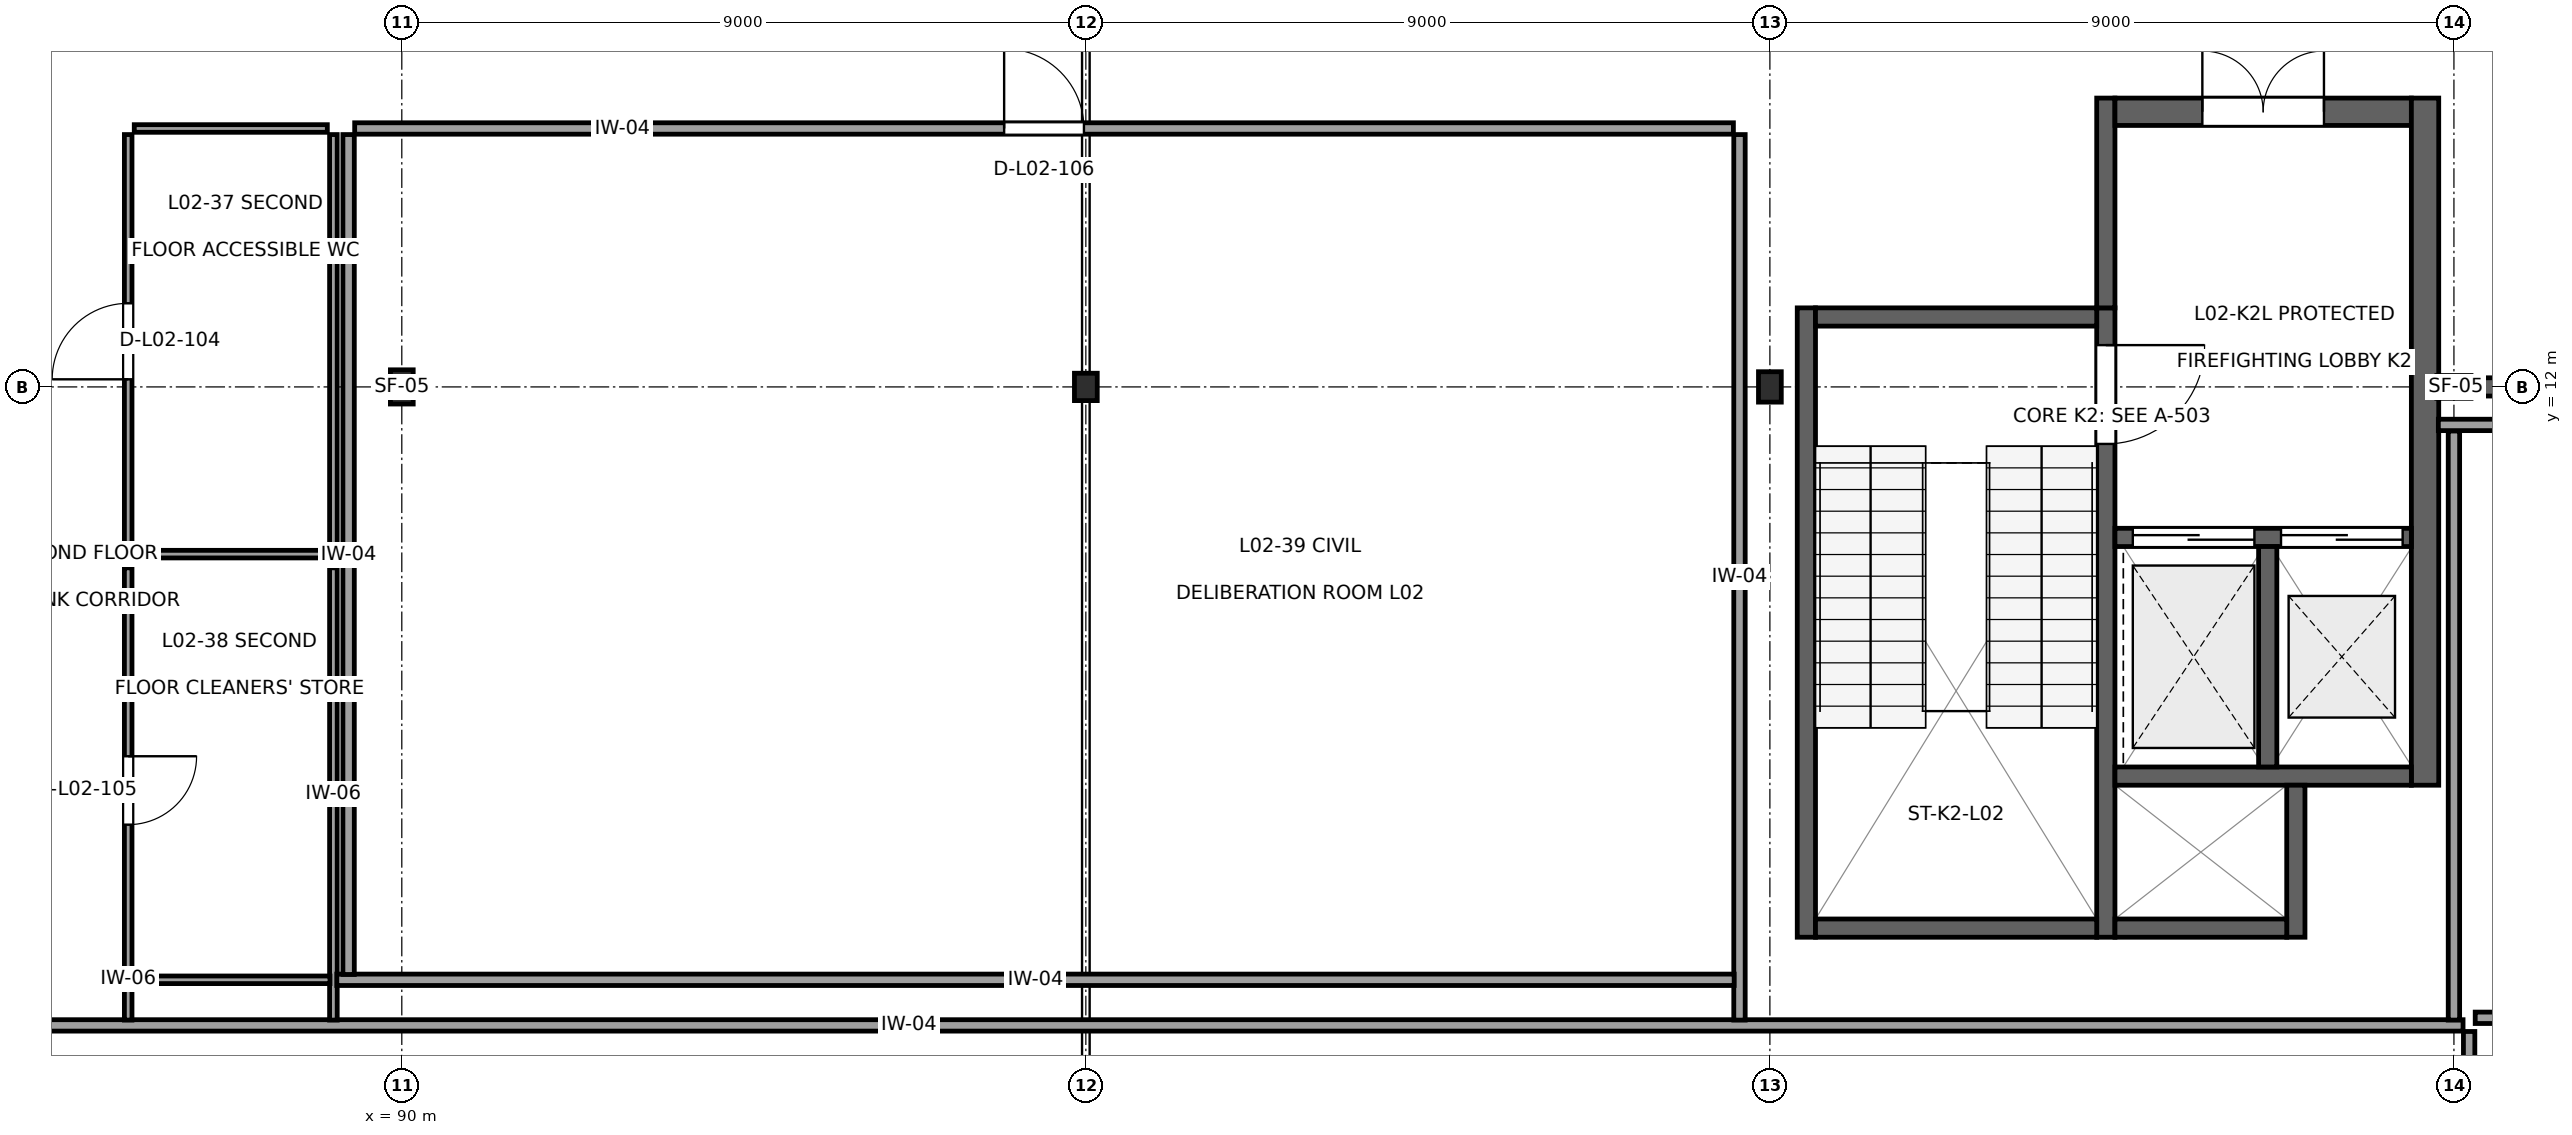
"""IFC4 building model, lengths in metres.
Left out: names, types, materials, properties, quantities, classifications, styles, units other than length and angle.
Written with IfcOpenShell. Run it as: python <this file> out.ifc"""

import sys

from ifc_helpers import new_model, si_unit, direction, frame, frame_2d, origin, origin_2d, place, context, subcontext, project, spatial, rectangle, i_section, extrude, element, fill, save


model = new_model("IFC4")
c1 = context("Model", 3, precision=1e-05, world=origin(), true_north=direction((0.0, 1.0)))
c2 = subcontext(c1, "Body", "Model", "MODEL_VIEW")
j1 = project(units=[si_unit("LENGTHUNIT", "METRE"), si_unit("PLANEANGLEUNIT", "RADIAN")], contexts=[c1])
p1 = place(None, origin())
s1 = spatial("IfcSite", under=j1, at=p1, CompositionType="ELEMENT")
p2 = place(p1, origin())
s2 = spatial("IfcBuilding", under=s1, at=p2, CompositionType="ELEMENT")
p3 = place(p2, frame((0.0, 0.0, 9.9)))
s3 = spatial("IfcBuildingStorey", under=s2, at=p3, CompositionType="ELEMENT", Elevation=9.9)
p4 = place(p3, frame((90.0, 12.0, 0.0), z_axis=(0.0, 0.0, 1.0), x_axis=(1.0, 0.0, 0.0)))
e1 = element("IfcColumn", 1, at=p4, inside=s3, PredefinedType="COLUMN", context=c2, shape_type="SweptSolid", body=[
    extrude(i_section(OverallWidth=0.3, OverallDepth=0.45, WebThickness=0.014, FlangeThickness=0.026, at=origin_2d()), origin(), (0.0, 0.0, 1.0), 4.5),
])
p5 = place(p3, frame((99.0, 12.0, 0.0), z_axis=(0.0, 0.0, 1.0), x_axis=(1.0, 0.0, 0.0)))
e2 = element("IfcColumn", 2, at=p5, inside=s3, PredefinedType="COLUMN", context=c2, shape_type="SweptSolid", body=[
    extrude(i_section(OverallWidth=0.3, OverallDepth=0.36, WebThickness=0.012, FlangeThickness=0.022, at=origin_2d()), origin(), (0.0, 0.0, 1.0), 4.5),
])
p6 = place(p3, frame((108.0, 12.0, 0.0), z_axis=(0.0, 0.0, 1.0), x_axis=(1.0, 0.0, 0.0)))
e3 = element("IfcColumn", 3, at=p6, inside=s3, PredefinedType="COLUMN", context=c2, shape_type="SweptSolid", body=[
    extrude(i_section(OverallWidth=0.3, OverallDepth=0.4, WebThickness=0.013, FlangeThickness=0.024, at=origin_2d()), origin(), (0.0, 0.0, 1.0), 4.5),
])
p7 = place(p3, frame((117.0, 12.0, 0.0), z_axis=(0.0, 0.0, 1.0), x_axis=(0.0, 1.0, 0.0)))
e4 = element("IfcColumn", 4, at=p7, inside=s3, PredefinedType="COLUMN", context=c2, shape_type="SweptSolid", body=[
    extrude(i_section(OverallWidth=0.3, OverallDepth=0.45, WebThickness=0.014, FlangeThickness=0.026, at=origin_2d()), origin(), (0.0, 0.0, 1.0), 4.5),
])
p8 = place(p3, frame((108.48, 4.76, 0.0), z_axis=(0.0, 0.0, 1.0), x_axis=(0.0, 1.0, 0.0)))
e5 = element("IfcWall", 5, at=p8, inside=s3, PredefinedType="SHEAR", context=c2, shape_type="SweptSolid", body=[
    extrude(rectangle(XDim=8.28, YDim=0.24, at=frame_2d((4.14, 0.0))), origin(), (0.0, 0.0, 1.0), 4.31),
])
p9 = place(p3, frame((112.42, 4.76, 0.0), z_axis=(0.0, 0.0, 1.0), x_axis=(0.0, 1.0, 0.0)))
e6 = element("IfcWall", 6, at=p9, inside=s3, PredefinedType="SHEAR", context=c2, shape_type="SweptSolid", body=[
    extrude(rectangle(XDim=8.28, YDim=0.24, at=frame_2d((4.14, 0.0))), origin(), (0.0, 0.0, 1.0), 4.31),
])
p10 = place(p9, frame((6.49, 0.0, 0.0)))
e7 = element("IfcOpeningElement", 7, at=p10, cuts=e6, PredefinedType="OPENING", context=c2, shape_type="SweptSolid", body=[
    extrude(rectangle(XDim=1.3, YDim=2.2, at=frame_2d((0.65, 1.1))), frame((0.0, 0.135, 0.0), z_axis=(0.0, -1.0, 0.0), x_axis=(1.0, 0.0, 0.0)), (0.0, 0.0, 1.0), 0.27),
])
for number, where, z_axis, x_axis in (
    (8, (108.6, 4.88, 0.0), (0.0, 0.0, 1.0), (1.0, 0.0, 0.0)),
    (9, (108.6, 12.92, 0.0), (0.0, 0.0, 1.0), (1.0, 0.0, 0.0)),
):
    element("IfcWall", number, at=place(p3, frame(where, z_axis=z_axis, x_axis=x_axis)), inside=s3, PredefinedType="SHEAR", context=c2, shape_type="SweptSolid", body=[
        extrude(rectangle(XDim=3.7, YDim=0.24, at=frame_2d((1.85, 0.0))), origin(), (0.0, 0.0, 1.0), 4.31),
    ])
p11 = place(p3, frame((112.42, 13.04, 0.0), z_axis=(0.0, 0.0, 1.0), x_axis=(0.0, 1.0, 0.0)))
e10 = element("IfcWall", 10, at=p11, inside=s3, PredefinedType="SHEAR", context=c2, shape_type="SweptSolid", body=[
    extrude(rectangle(XDim=2.76, YDim=0.24, at=frame_2d((1.38, 0.0))), origin(), (0.0, 0.0, 1.0), 4.16),
])
p12 = place(p3, frame((112.54, 15.62, 0.0), z_axis=(0.0, 0.0, 1.0), x_axis=(1.0, 0.0, 0.0)))
e11 = element("IfcWall", 11, at=p12, inside=s3, PredefinedType="SHEAR", context=c2, shape_type="SweptSolid", body=[
    extrude(rectangle(XDim=3.9, YDim=0.36, at=frame_2d((1.95, 0.0))), origin(), (0.0, 0.0, 1.0), 4.16),
])
p13 = place(p12, frame((1.15, 0.0, 0.0)))
e12 = element("IfcOpeningElement", 12, at=p13, cuts=e11, PredefinedType="OPENING", context=c2, shape_type="SweptSolid", body=[
    extrude(rectangle(XDim=1.6, YDim=2.25, at=frame_2d((0.8, 1.125))), frame((0.0, 0.195, 0.0), z_axis=(0.0, -1.0, 0.0), x_axis=(1.0, 0.0, 0.0)), (0.0, 0.0, 1.0), 0.39),
])
p14 = place(p3, frame((116.62, 6.76, 0.0), z_axis=(0.0, 0.0, 1.0), x_axis=(0.0, 1.0, 0.0)))
e13 = element("IfcWall", 13, at=p14, inside=s3, PredefinedType="SHEAR", context=c2, shape_type="SweptSolid", body=[
    extrude(rectangle(XDim=9.04, YDim=0.36, at=frame_2d((4.52, 0.0))), origin(), (0.0, 0.0, 1.0), 4.16),
])
p15 = place(p3, frame((112.54, 10.02, 0.0), z_axis=(0.0, 0.0, 1.0), x_axis=(1.0, 0.0, 0.0)))
e14 = element("IfcWall", 14, at=p15, inside=s3, PredefinedType="SHEAR", context=c2, shape_type="SweptSolid", body=[
    extrude(rectangle(XDim=3.9, YDim=0.24, at=frame_2d((1.95, 0.0))), origin(), (0.0, 0.0, 1.0), 4.31),
])
p16 = place(p15, frame((0.235, 0.0, 0.0)))
e15 = element("IfcOpeningElement", 15, at=p16, cuts=e14, PredefinedType="OPENING", context=c2, shape_type="SweptSolid", body=[
    extrude(rectangle(XDim=1.6, YDim=2.3, at=frame_2d((0.8, 1.15))), frame((0.0, 0.135, 0.0), z_axis=(0.0, -1.0, 0.0), x_axis=(1.0, 0.0, 0.0)), (0.0, 0.0, 1.0), 0.27),
])
p17 = place(p15, frame((2.185, 0.0, 0.0)))
e16 = element("IfcOpeningElement", 16, at=p17, cuts=e14, PredefinedType="OPENING", context=c2, shape_type="SweptSolid", body=[
    extrude(rectangle(XDim=1.6, YDim=2.3, at=frame_2d((0.8, 1.15))), frame((0.0, 0.135, 0.0), z_axis=(0.0, -1.0, 0.0), x_axis=(1.0, 0.0, 0.0)), (0.0, 0.0, 1.0), 0.27),
])
p18 = place(p3, frame((112.54, 6.88, 0.0), z_axis=(0.0, 0.0, 1.0), x_axis=(1.0, 0.0, 0.0)))
e17 = element("IfcWall", 17, at=p18, inside=s3, PredefinedType="SHEAR", context=c2, shape_type="SweptSolid", body=[
    extrude(rectangle(XDim=3.9, YDim=0.24, at=frame_2d((1.95, 0.0))), origin(), (0.0, 0.0, 1.0), 4.31),
])
p19 = place(p3, frame((114.55, 7.0, 0.0), z_axis=(0.0, 0.0, 1.0), x_axis=(0.0, 1.0, 0.0)))
e18 = element("IfcWall", 18, at=p19, inside=s3, PredefinedType="SHEAR", context=c2, shape_type="SweptSolid", body=[
    extrude(rectangle(XDim=2.9, YDim=0.24, at=frame_2d((1.45, 0.0))), origin(), (0.0, 0.0, 1.0), 4.31),
])
p20 = place(p3, frame((114.92, 4.76, 0.0), z_axis=(0.0, 0.0, 1.0), x_axis=(0.0, 1.0, 0.0)))
e19 = element("IfcWall", 19, at=p20, inside=s3, PredefinedType="SHEAR", context=c2, shape_type="SweptSolid", body=[
    extrude(rectangle(XDim=2.0, YDim=0.24, at=frame_2d((1.0, 0.0))), origin(), (0.0, 0.0, 1.0), 4.31),
])
p21 = place(p3, frame((112.54, 4.88, 0.0), z_axis=(0.0, 0.0, 1.0), x_axis=(1.0, 0.0, 0.0)))
e20 = element("IfcWall", 20, at=p21, inside=s3, PredefinedType="SHEAR", context=c2, shape_type="SweptSolid", body=[
    extrude(rectangle(XDim=2.26, YDim=0.24, at=frame_2d((1.13, 0.0))), origin(), (0.0, 0.0, 1.0), 4.31),
])
p22 = place(p3, frame((117.223, 12.0, 0.0), z_axis=(0.0, 0.0, 1.0), x_axis=(1.0, 0.0, 0.0)))
e21 = element("IfcWall", 21, at=p22, inside=s3, PredefinedType="SHEAR", context=c2, shape_type="SweptSolid", body=[
    extrude(rectangle(XDim=8.769, YDim=0.24, at=frame_2d((4.385, 0.0))), origin(), (0.0, 0.0, 1.0), 3.675),
])
p23 = place(p3, frame((46.08, 3.6, 0.0), z_axis=(0.0, 0.0, 1.0), x_axis=(1.0, 0.0, 0.0)))
e22 = element("IfcWall", 22, at=p23, inside=s3, PredefinedType="PARTITIONING", context=c2, shape_type="SweptSolid", body=[
    extrude(rectangle(XDim=71.04, YDim=0.15, at=frame_2d((35.52, 0.0))), origin(), (0.0, 0.0, 1.0), 4.14),
])
p24 = place(p23, frame((27.595, 0.0, 0.0)))
e23 = element("IfcOpeningElement", 23, at=p24, cuts=e22, PredefinedType="OPENING", context=c2, shape_type="SweptSolid", body=[
    extrude(rectangle(XDim=1.05, YDim=2.25, at=frame_2d((0.525, 1.125))), frame((0.0, 0.09, 0.0), z_axis=(0.0, -1.0, 0.0), x_axis=(1.0, 0.0, 0.0)), (0.0, 0.0, 1.0), 0.18),
])
p25 = place(p3, frame((117.2, 3.52, 0.0), z_axis=(0.0, 0.0, 1.0), x_axis=(0.0, -1.0, 0.0)))
e24 = element("IfcWall", 24, at=p25, inside=s3, PredefinedType="PARTITIONING", context=c2, shape_type="SweptSolid", body=[
    extrude(rectangle(XDim=3.322, YDim=0.15, at=frame_2d((1.661, 0.0))), origin(), (0.0, 0.0, 1.0), 3.625),
])
p26 = place(p3, frame((134.855, 3.7, 0.0), z_axis=(0.0, 0.0, 1.0), x_axis=(-1.0, 0.0, 0.0)))
e25 = element("IfcWall", 25, at=p26, inside=s3, PredefinedType="PARTITIONING", context=c2, shape_type="SweptSolid", body=[
    extrude(rectangle(XDim=17.575, YDim=0.15, at=frame_2d((8.788, 0.0))), origin(), (0.0, 0.0, 1.0), 4.14),
])
p27 = place(p3, frame((117.0, 3.67, 0.0), z_axis=(0.0, 0.0, 1.0), x_axis=(0.0, 1.0, 0.0)))
e26 = element("IfcWall", 26, at=p27, inside=s3, PredefinedType="PARTITIONING", context=c2, shape_type="SweptSolid", body=[
    extrude(rectangle(XDim=7.75, YDim=0.15, at=frame_2d((3.875, 0.0))), origin(), (0.0, 0.0, 1.0), 3.625),
])
p28 = place(p3, frame((116.795, 11.5, 0.0), z_axis=(0.0, 0.0, 1.0), x_axis=(1.0, 0.0, 0.0)))
e27 = element("IfcWall", 27, at=p28, inside=s3, PredefinedType="PARTITIONING", context=c2, shape_type="SweptSolid", body=[
    extrude(rectangle(XDim=9.425, YDim=0.15, at=frame_2d((4.712, 0.0))), origin(), (0.0, 0.0, 1.0), 4.14),
])
p29 = place(p3, frame((86.4, 9.88, 0.0), z_axis=(0.0, 0.0, 1.0), x_axis=(0.0, 1.0, 0.0)))
e28 = element("IfcWall", 28, at=p29, inside=s3, PredefinedType="PARTITIONING", context=c2, shape_type="SweptSolid", body=[
    extrude(rectangle(XDim=5.44, YDim=0.1, at=frame_2d((2.72, 0.0))), origin(), (0.0, 0.0, 1.0), 4.14),
])
p30 = place(p29, frame((2.22, 0.0, 0.0)))
e29 = element("IfcOpeningElement", 29, at=p30, cuts=e28, PredefinedType="OPENING", context=c2, shape_type="SweptSolid", body=[
    extrude(rectangle(XDim=1.0, YDim=2.1, at=frame_2d((0.5, 1.05))), frame((0.0, 0.065, 0.0), z_axis=(0.0, -1.0, 0.0), x_axis=(1.0, 0.0, 0.0)), (0.0, 0.0, 1.0), 0.13),
])
p31 = place(p3, frame((86.48, 15.4, 0.0), z_axis=(0.0, 0.0, 1.0), x_axis=(1.0, 0.0, 0.0)))
e30 = element("IfcWall", 30, at=p31, inside=s3, PredefinedType="PARTITIONING", context=c2, shape_type="SweptSolid", body=[
    extrude(rectangle(XDim=2.54, YDim=0.1, at=frame_2d((1.27, 0.0))), origin(), (0.0, 0.0, 1.0), 4.14),
])
p32 = place(p3, frame((89.1, 15.32, 0.0), z_axis=(0.0, 0.0, 1.0), x_axis=(0.0, -1.0, 0.0)))
e31 = element("IfcWall", 31, at=p32, inside=s3, PredefinedType="PARTITIONING", context=c2, shape_type="SweptSolid", body=[
    extrude(rectangle(XDim=5.44, YDim=0.1, at=frame_2d((2.72, 0.0))), origin(), (0.0, 0.0, 1.0), 4.14),
])
p33 = place(p3, frame((89.02, 9.8, 0.0), z_axis=(0.0, 0.0, 1.0), x_axis=(-1.0, 0.0, 0.0)))
e32 = element("IfcWall", 32, at=p33, inside=s3, PredefinedType="PARTITIONING", context=c2, shape_type="SweptSolid", body=[
    extrude(rectangle(XDim=2.54, YDim=0.1, at=frame_2d((1.27, 0.0))), origin(), (0.0, 0.0, 1.0), 4.14),
])
p34 = place(p3, frame((89.1, 9.62, 0.0), z_axis=(0.0, 0.0, 1.0), x_axis=(0.0, -1.0, 0.0)))
e33 = element("IfcWall", 33, at=p34, inside=s3, PredefinedType="PARTITIONING", context=c2, shape_type="SweptSolid", body=[
    extrude(rectangle(XDim=5.95, YDim=0.1, at=frame_2d((2.975, 0.0))), origin(), (0.0, 0.0, 1.0), 4.14),
])
p35 = place(p3, frame((89.055, 4.2, 0.0), z_axis=(0.0, 0.0, 1.0), x_axis=(-1.0, 0.0, 0.0)))
e34 = element("IfcWall", 34, at=p35, inside=s3, PredefinedType="PARTITIONING", context=c2, shape_type="SweptSolid", body=[
    extrude(rectangle(XDim=2.575, YDim=0.1, at=frame_2d((1.288, 0.0))), origin(), (0.0, 0.0, 1.0), 4.14),
])
p36 = place(p3, frame((86.4, 3.67, 0.0), z_axis=(0.0, 0.0, 1.0), x_axis=(0.0, 1.0, 0.0)))
e35 = element("IfcWall", 35, at=p36, inside=s3, PredefinedType="PARTITIONING", context=c2, shape_type="SweptSolid", body=[
    extrude(rectangle(XDim=5.95, YDim=0.1, at=frame_2d((2.975, 0.0))), origin(), (0.0, 0.0, 1.0), 4.14),
])
p37 = place(p36, frame((2.571, 0.0, 0.0)))
e36 = element("IfcOpeningElement", 36, at=p37, cuts=e35, PredefinedType="OPENING", context=c2, shape_type="SweptSolid", body=[
    extrude(rectangle(XDim=0.9, YDim=2.05, at=frame_2d((0.45, 1.025))), frame((0.0, 0.065, 0.0), z_axis=(0.0, -1.0, 0.0), x_axis=(1.0, 0.0, 0.0)), (0.0, 0.0, 1.0), 0.13),
])
p38 = place(p3, frame((107.6, 15.32, 0.0), z_axis=(0.0, 0.0, 1.0), x_axis=(0.0, -1.0, 0.0)))
e37 = element("IfcWall", 37, at=p38, inside=s3, PredefinedType="PARTITIONING", context=c2, shape_type="SweptSolid", body=[
    extrude(rectangle(XDim=11.65, YDim=0.15, at=frame_2d((5.825, 0.0))), origin(), (0.0, 0.0, 1.0), 4.14),
])
p39 = place(p3, frame((107.53, 4.2, 0.0), z_axis=(0.0, 0.0, 1.0), x_axis=(-1.0, 0.0, 0.0)))
e38 = element("IfcWall", 38, at=p39, inside=s3, PredefinedType="PARTITIONING", context=c2, shape_type="SweptSolid", body=[
    extrude(rectangle(XDim=18.385, YDim=0.15, at=frame_2d((9.192, 0.0))), origin(), (0.0, 0.0, 1.0), 4.14),
])
p40 = place(p3, frame((89.3, 4.27, 0.0), z_axis=(0.0, 0.0, 1.0), x_axis=(0.0, 1.0, 0.0)))
e39 = element("IfcWall", 39, at=p40, inside=s3, PredefinedType="PARTITIONING", context=c2, shape_type="SweptSolid", body=[
    extrude(rectangle(XDim=11.05, YDim=0.15, at=frame_2d((5.525, 0.0))), origin(), (0.0, 0.0, 1.0), 4.14),
])
p41 = place(p3, frame((89.38, 15.4, 0.0), z_axis=(0.0, 0.0, 1.0), x_axis=(1.0, 0.0, 0.0)))
e40 = element("IfcWall", 40, at=p41, inside=s3, PredefinedType="PARTITIONING", context=c2, shape_type="SweptSolid", body=[
    extrude(rectangle(XDim=18.14, YDim=0.15, at=frame_2d((9.07, 0.0))), origin(), (0.0, 0.0, 1.0), 4.14),
])
p42 = place(p41, frame((8.545, 0.0, 0.0)))
e41 = element("IfcOpeningElement", 41, at=p42, cuts=e40, PredefinedType="OPENING", context=c2, shape_type="SweptSolid", body=[
    extrude(rectangle(XDim=1.05, YDim=2.25, at=frame_2d((0.525, 1.125))), frame((0.0, 0.09, 0.0), z_axis=(0.0, -1.0, 0.0), x_axis=(1.0, 0.0, 0.0)), (0.0, 0.0, 1.0), 0.18),
])
p43 = place(p10, frame((1.3, 0.0, 0.0), z_axis=(0.0, 0.0, 1.0), x_axis=(-1.0, 0.0, 0.0)))
e42 = element("IfcDoor", 42, at=p43, inside=s3, OperationType="SINGLE_SWING_RIGHT", PredefinedType="DOOR", context=c2, shape_type="SweptSolid", body=[
    extrude(rectangle(XDim=1.3, YDim=2.2, at=frame_2d((0.65, 1.1))), frame((0.0, 0.025, 0.0), z_axis=(0.0, -1.0, 0.0), x_axis=(1.0, 0.0, 0.0)), (0.0, 0.0, 1.0), 0.05),
])
fill(e7, e42)
p44 = place(p13, origin())
e43 = element("IfcDoor", 43, at=p44, inside=s3, OperationType="DOUBLE_DOOR_SINGLE_SWING", PredefinedType="DOOR", context=c2, shape_type="SweptSolid", body=[
    extrude(rectangle(XDim=1.6, YDim=2.25, at=frame_2d((0.8, 1.125))), frame((0.0, 0.025, 0.0), z_axis=(0.0, -1.0, 0.0), x_axis=(1.0, 0.0, 0.0)), (0.0, 0.0, 1.0), 0.05),
])
fill(e12, e43)
p45 = place(p16, origin())
e44 = element("IfcDoor", 44, at=p45, inside=s3, OperationType="DOUBLE_DOOR_SLIDING", PredefinedType="DOOR", context=c2, shape_type="SweptSolid", body=[
    extrude(rectangle(XDim=1.6, YDim=2.3, at=frame_2d((0.8, 1.15))), frame((0.0, 0.025, 0.0), z_axis=(0.0, -1.0, 0.0), x_axis=(1.0, 0.0, 0.0)), (0.0, 0.0, 1.0), 0.05),
])
fill(e15, e44)
p46 = place(p17, origin())
e45 = element("IfcDoor", 45, at=p46, inside=s3, OperationType="DOUBLE_DOOR_SLIDING", PredefinedType="DOOR", context=c2, shape_type="SweptSolid", body=[
    extrude(rectangle(XDim=1.6, YDim=2.3, at=frame_2d((0.8, 1.15))), frame((0.0, 0.025, 0.0), z_axis=(0.0, -1.0, 0.0), x_axis=(1.0, 0.0, 0.0)), (0.0, 0.0, 1.0), 0.05),
])
fill(e16, e45)
p47 = place(p30, origin())
e46 = element("IfcDoor", 46, at=p47, inside=s3, OperationType="SINGLE_SWING_LEFT", PredefinedType="DOOR", context=c2, shape_type="SweptSolid", body=[
    extrude(rectangle(XDim=1.0, YDim=2.1, at=frame_2d((0.5, 1.05))), frame((0.0, 0.025, 0.0), z_axis=(0.0, -1.0, 0.0), x_axis=(1.0, 0.0, 0.0)), (0.0, 0.0, 1.0), 0.05),
])
fill(e29, e46)
p48 = place(p37, frame((0.9, 0.0, 0.0), z_axis=(0.0, 0.0, 1.0), x_axis=(-1.0, 0.0, 0.0)))
e47 = element("IfcDoor", 47, at=p48, inside=s3, OperationType="SINGLE_SWING_RIGHT", PredefinedType="DOOR", context=c2, shape_type="SweptSolid", body=[
    extrude(rectangle(XDim=0.9, YDim=2.05, at=frame_2d((0.45, 1.025))), frame((0.0, 0.025, 0.0), z_axis=(0.0, -1.0, 0.0), x_axis=(1.0, 0.0, 0.0)), (0.0, 0.0, 1.0), 0.05),
])
fill(e36, e47)
p49 = place(p42, origin())
e48 = element("IfcDoor", 48, at=p49, inside=s3, OperationType="SINGLE_SWING_LEFT", PredefinedType="DOOR", context=c2, shape_type="SweptSolid", body=[
    extrude(rectangle(XDim=1.05, YDim=2.25, at=frame_2d((0.525, 1.125))), frame((0.0, 0.025, 0.0), z_axis=(0.0, -1.0, 0.0), x_axis=(1.0, 0.0, 0.0)), (0.0, 0.0, 1.0), 0.05),
])
fill(e41, e48)
save(model, sys.argv[1])
